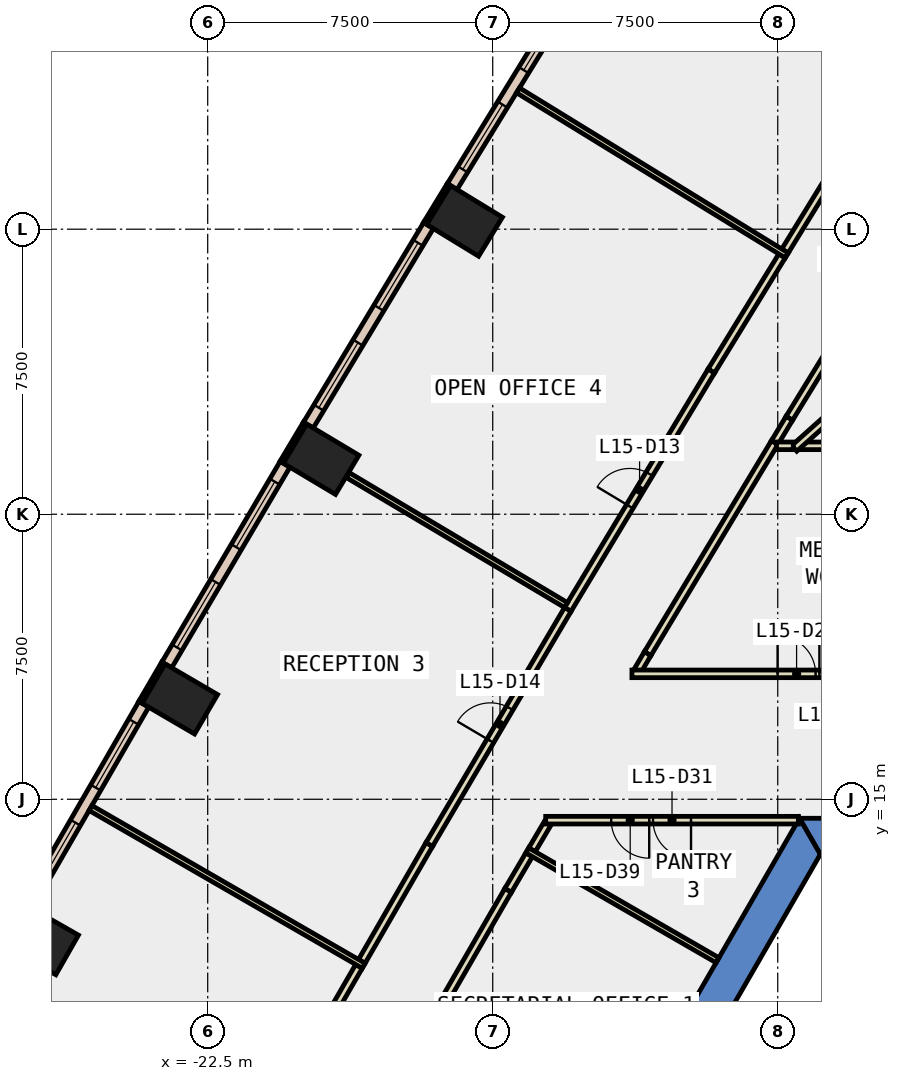
"""IFC4 building model, lengths in metres.
Left out: names, types, materials, properties, quantities, classifications, styles, units other than length and angle.
Written with IfcOpenShell. Run it as: python <this file> out.ifc"""

import sys

from ifc_helpers import new_model, si_unit, direction, frame, frame_2d, origin, origin_2d, place, context, subcontext, project, spatial, polyline, rectangle, outline, extrude, element, fill, save


model = new_model("IFC4")
c1 = context("Model", 3, precision=1e-05, world=origin(), true_north=direction((0.0, 1.0)))
c2 = subcontext(c1, "Body", "Model", "MODEL_VIEW")
j1 = project(units=[si_unit("LENGTHUNIT", "METRE"), si_unit("PLANEANGLEUNIT", "RADIAN")], contexts=[c1])
p1 = place(None, origin())
s1 = spatial("IfcSite", under=j1, at=p1, CompositionType="ELEMENT")
p2 = place(p1, origin())
s2 = spatial("IfcBuilding", under=s1, at=p2, CompositionType="ELEMENT")
p3 = place(p2, frame((0.0, 0.0, 72.8)))
s3 = spatial("IfcBuildingStorey", under=s2, at=p3, CompositionType="ELEMENT", Elevation=72.8)
for number, where, z_axis, x_axis in (
    (1, (-15.741, 30.219, -0.4), (0.0, 0.0, 1.0), (0.522, 0.853, 0.0)),
    (2, (-19.516, 23.947, -0.4), (0.0, 0.0, 1.0), (0.513, 0.858, 0.0)),
    (3, (-23.234, 17.64, -0.4), (0.0, 0.0, 1.0), (0.504, 0.864, 0.0)),
    (4, (-26.894, 11.301, -0.4), (0.0, 0.0, 1.0), (0.496, 0.869, 0.0)),
):
    element("IfcColumn", number, at=place(p3, frame(where, z_axis=z_axis, x_axis=x_axis)), inside=s3, PredefinedType="COLUMN", context=c2, shape_type="SweptSolid", body=[
        extrude(rectangle(XDim=1.2, YDim=1.6, at=origin_2d()), origin(), (0.0, 0.0, 1.0), 4.2),
    ])
p4 = place(p3, frame((0.0, 0.0, -0.4)))
e5 = element("IfcWall", 5, at=p4, inside=s3, PredefinedType="SHEAR", context=c2, shape_type="SweptSolid", body=[
    extrude(outline(polyline([(-4.55, 13.55), (-4.55, 14.5), (-6.928, 14.5), (-6.38, 13.55), (-4.55, 13.55)])), origin(), (0.0, 0.0, 1.0), 4.2),
])
p5 = place(p3, frame((0.0, 0.0, -0.4)))
e6 = element("IfcWall", 6, at=p5, inside=s3, PredefinedType="SHEAR", context=c2, shape_type="SweptSolid", body=[
    extrude(outline(polyline([(-12.267, 5.252), (-11.444, 4.777), (-6.38, 13.55), (-6.928, 14.5), (-12.267, 5.252)])), origin(), (0.0, 0.0, 1.0), 4.2),
])
p6 = place(p3, frame((-16.153, 31.174, 0.0), z_axis=(0.0, 0.0, 1.0), x_axis=(-0.521507599072, -0.853246637327, 0.0)))
e7 = element("IfcWall", 7, at=p6, inside=s3, PredefinedType="STANDARD", context=c2, shape_type="SweptSolid", body=[
    extrude(rectangle(XDim=1.2, YDim=0.1, at=frame_2d((0.6, 0.0))), origin(), (0.0, 0.0, 1.0), 3.8),
])
p7 = place(p3, frame((-19.938, 24.898, 0.0), z_axis=(0.0, 0.0, 1.0), x_axis=(-0.513238760752, -0.858245870635, 0.0)))
e8 = element("IfcWall", 8, at=p7, inside=s3, PredefinedType="STANDARD", context=c2, shape_type="SweptSolid", body=[
    extrude(rectangle(XDim=1.2, YDim=0.1, at=frame_2d((0.6, 0.0))), origin(), (0.0, 0.0, 1.0), 3.8),
])
p8 = place(p3, frame((-23.665, 18.587, 0.0), z_axis=(0.0, 0.0, 1.0), x_axis=(-0.504313844903, -0.863520437418, 0.0)))
e9 = element("IfcWall", 9, at=p8, inside=s3, PredefinedType="STANDARD", context=c2, shape_type="SweptSolid", body=[
    extrude(rectangle(XDim=1.2, YDim=0.1, at=frame_2d((0.6, 0.0))), origin(), (0.0, 0.0, 1.0), 3.8),
])
p9 = place(p3, frame((-12.858, 36.344, 0.0), z_axis=(0.0, 0.0, 1.0), x_axis=(-0.523421823151, -0.852073702827, 0.0)))
e10 = element("IfcWall", 10, at=p9, inside=s3, PredefinedType="STANDARD", context=c2, shape_type="SweptSolid", body=[
    extrude(rectangle(XDim=6.131, YDim=0.3, at=frame_2d((3.065, 0.0))), origin(), (0.0, 0.0, 1.0), 3.8),
])
p10 = place(p9, frame((0.533, 0.0, 0.9)))
e11 = element("IfcOpeningElement", 11, at=p10, cuts=e10, PredefinedType="OPENING", context=c2, shape_type="SweptSolid", body=[
    extrude(rectangle(XDim=2.0, YDim=2.6, at=frame_2d((1.0, 1.3))), frame((0.0, 0.16, 0.0), z_axis=(0.0, -1.0, 0.0), x_axis=(1.0, 0.0, 0.0)), (0.0, 0.0, 1.0), 0.32),
])
p11 = place(p9, frame((3.598, 0.0, 0.9)))
e12 = element("IfcOpeningElement", 12, at=p11, cuts=e10, PredefinedType="OPENING", context=c2, shape_type="SweptSolid", body=[
    extrude(rectangle(XDim=2.0, YDim=2.6, at=frame_2d((1.0, 1.3))), frame((0.0, 0.16, 0.0), z_axis=(0.0, -1.0, 0.0), x_axis=(1.0, 0.0, 0.0)), (0.0, 0.0, 1.0), 0.32),
])
p12 = place(p3, frame((-16.69, 30.097, 0.0), z_axis=(0.0, 0.0, 1.0), x_axis=(-0.515690089348, -0.856775193238, 0.0)))
e13 = element("IfcWall", 13, at=p12, inside=s3, PredefinedType="STANDARD", context=c2, shape_type="SweptSolid", body=[
    extrude(rectangle(XDim=6.13, YDim=0.3, at=frame_2d((3.065, 0.0))), origin(), (0.0, 0.0, 1.0), 3.8),
])
p13 = place(p12, frame((0.532, 0.0, 0.9)))
e14 = element("IfcOpeningElement", 14, at=p13, cuts=e13, PredefinedType="OPENING", context=c2, shape_type="SweptSolid", body=[
    extrude(rectangle(XDim=2.0, YDim=2.6, at=frame_2d((1.0, 1.3))), frame((0.0, 0.16, 0.0), z_axis=(0.0, -1.0, 0.0), x_axis=(1.0, 0.0, 0.0)), (0.0, 0.0, 1.0), 0.32),
])
p14 = place(p12, frame((3.597, 0.0, 0.9)))
e15 = element("IfcOpeningElement", 15, at=p14, cuts=e13, PredefinedType="OPENING", context=c2, shape_type="SweptSolid", body=[
    extrude(rectangle(XDim=2.0, YDim=2.6, at=frame_2d((1.0, 1.3))), frame((0.0, 0.16, 0.0), z_axis=(0.0, -1.0, 0.0), x_axis=(1.0, 0.0, 0.0)), (0.0, 0.0, 1.0), 0.32),
])
p15 = place(p3, frame((-20.464, 23.816, 0.0), z_axis=(0.0, 0.0, 1.0), x_axis=(-0.507716058644, -0.861524465001, 0.0)))
e16 = element("IfcWall", 16, at=p15, inside=s3, PredefinedType="STANDARD", context=c2, shape_type="SweptSolid", body=[
    extrude(rectangle(XDim=6.131, YDim=0.3, at=frame_2d((3.065, 0.0))), origin(), (0.0, 0.0, 1.0), 3.8),
])
p16 = place(p15, frame((0.533, 0.0, 0.9)))
e17 = element("IfcOpeningElement", 17, at=p16, cuts=e16, PredefinedType="OPENING", context=c2, shape_type="SweptSolid", body=[
    extrude(rectangle(XDim=2.0, YDim=2.6, at=frame_2d((1.0, 1.3))), frame((0.0, 0.16, 0.0), z_axis=(0.0, -1.0, 0.0), x_axis=(1.0, 0.0, 0.0)), (0.0, 0.0, 1.0), 0.32),
])
p17 = place(p15, frame((3.598, 0.0, 0.9)))
e18 = element("IfcOpeningElement", 18, at=p17, cuts=e16, PredefinedType="OPENING", context=c2, shape_type="SweptSolid", body=[
    extrude(rectangle(XDim=2.0, YDim=2.6, at=frame_2d((1.0, 1.3))), frame((0.0, 0.16, 0.0), z_axis=(0.0, -1.0, 0.0), x_axis=(1.0, 0.0, 0.0)), (0.0, 0.0, 1.0), 0.32),
])
p18 = place(p3, frame((-24.181, 17.5, 0.0), z_axis=(0.0, 0.0, 1.0), x_axis=(-0.499998239139, -0.866026420416, 0.0)))
e19 = element("IfcWall", 19, at=p18, inside=s3, PredefinedType="STANDARD", context=c2, shape_type="SweptSolid", body=[
    extrude(rectangle(XDim=6.13, YDim=0.3, at=frame_2d((3.065, 0.0))), origin(), (0.0, 0.0, 1.0), 3.8),
])
p19 = place(p18, frame((0.533, 0.0, 0.9)))
e20 = element("IfcOpeningElement", 20, at=p19, cuts=e19, PredefinedType="OPENING", context=c2, shape_type="SweptSolid", body=[
    extrude(rectangle(XDim=2.0, YDim=2.6, at=frame_2d((1.0, 1.3))), frame((0.0, 0.16, 0.0), z_axis=(0.0, -1.0, 0.0), x_axis=(1.0, 0.0, 0.0)), (0.0, 0.0, 1.0), 0.32),
])
p20 = place(p18, frame((3.598, 0.0, 0.9)))
e21 = element("IfcOpeningElement", 21, at=p20, cuts=e19, PredefinedType="OPENING", context=c2, shape_type="SweptSolid", body=[
    extrude(rectangle(XDim=2.0, YDim=2.6, at=frame_2d((1.0, 1.3))), frame((0.0, 0.16, 0.0), z_axis=(0.0, -1.0, 0.0), x_axis=(1.0, 0.0, 0.0)), (0.0, 0.0, 1.0), 0.32),
])
p21 = place(p3, frame((-14.042, 13.541, 0.0), z_axis=(0.0, 0.0, 1.0), x_axis=(-0.507733830316, -0.861513991501, 0.0)))
e22 = element("IfcWall", 22, at=p21, inside=s3, PredefinedType="PARTITIONING", context=c2, shape_type="SweptSolid", body=[
    extrude(rectangle(XDim=1.091, YDim=0.2, at=frame_2d((0.545, 0.0))), origin(), (0.0, 0.0, 1.0), 3.8),
])
p22 = place(p3, frame((-14.596, 12.601, 0.0), z_axis=(0.0, 0.0, 1.0), x_axis=(-0.500017431331, -0.866015339567, 0.0)))
e23 = element("IfcWall", 23, at=p22, inside=s3, PredefinedType="PARTITIONING", context=c2, shape_type="SweptSolid", body=[
    extrude(rectangle(XDim=4.8, YDim=0.2, at=frame_2d((2.4, 0.0))), origin(), (0.0, 0.0, 1.0), 3.8),
])
p23 = place(p3, frame((-13.557, 14.364, 0.0), z_axis=(0.0, 0.0, 1.0), x_axis=(-0.507840899418, -0.861450881292, 0.0)))
e24 = element("IfcWall", 24, at=p23, inside=s3, PredefinedType="PARTITIONING", context=c2, shape_type="SweptSolid", body=[
    extrude(rectangle(XDim=0.806, YDim=0.2, at=frame_2d((0.403, 0.0))), origin(), (0.0, 0.0, 1.0), 3.8),
])
p24 = place(p3, frame((-7.58, 24.386, 0.0), z_axis=(0.0, 0.0, 1.0), x_axis=(-0.51574664882, -0.85674114774, 0.0)))
e25 = element("IfcWall", 25, at=p24, inside=s3, PredefinedType="PARTITIONING", context=c2, shape_type="SweptSolid", body=[
    extrude(rectangle(XDim=6.484, YDim=0.2, at=frame_2d((3.242, 0.0))), origin(), (0.0, 0.0, 1.0), 3.8),
])
p25 = place(p3, frame((-10.924, 18.831, 0.0), z_axis=(0.0, 0.0, 1.0), x_axis=(-0.507247363226, -0.861800506208, 0.0)))
e26 = element("IfcWall", 26, at=p25, inside=s3, PredefinedType="PARTITIONING", context=c2, shape_type="SweptSolid", body=[
    extrude(rectangle(XDim=0.516, YDim=0.2, at=frame_2d((0.258, 0.0))), origin(), (0.0, 0.0, 1.0), 3.8),
])
p26 = place(p3, frame((-3.411, 31.185, 0.0), z_axis=(0.0, 0.0, 1.0), x_axis=(-0.523464329994, -0.852047589765, 0.0)))
e27 = element("IfcWall", 27, at=p26, inside=s3, PredefinedType="PARTITIONING", context=c2, shape_type="SweptSolid", body=[
    extrude(rectangle(XDim=7.231, YDim=0.2, at=frame_2d((3.615, 0.0))), origin(), (0.0, 0.0, 1.0), 3.8),
])
p27 = place(p26, frame((3.115, 0.0, 0.0)))
e28 = element("IfcOpeningElement", 28, at=p27, cuts=e27, PredefinedType="OPENING", context=c2, shape_type="SweptSolid", body=[
    extrude(rectangle(XDim=1.0, YDim=2.1, at=frame_2d((0.5, 1.05))), frame((0.0, 0.11, 0.0), z_axis=(0.0, -1.0, 0.0), x_axis=(1.0, 0.0, 0.0)), (0.0, 0.0, 1.0), 0.22),
])
p28 = place(p3, frame((-7.196, 25.024, 0.0), z_axis=(0.0, 0.0, 1.0), x_axis=(-0.515748848873, -0.856739823334, 0.0)))
e29 = element("IfcWall", 29, at=p28, inside=s3, PredefinedType="PARTITIONING", context=c2, shape_type="SweptSolid", body=[
    extrude(rectangle(XDim=0.745, YDim=0.2, at=frame_2d((0.372, 0.0))), origin(), (0.0, 0.0, 1.0), 3.8),
])
p29 = place(p3, frame((-7.309, 29.426, 0.0), z_axis=(0.0, 0.0, 1.0), x_axis=(0.523617783711, 0.851953294836, 0.0)))
e30 = element("IfcWall", 30, at=p29, inside=s3, PredefinedType="PARTITIONING", context=c2, shape_type="SweptSolid", body=[
    extrude(rectangle(XDim=3.551, YDim=0.2, at=frame_2d((1.775, 0.0))), origin(), (0.0, 0.0, 1.0), 3.8),
])
p30 = place(p3, frame((-13.025, 19.995, 0.0), z_axis=(0.0, 0.0, 1.0), x_axis=(0.515828195336, 0.856692052546, 0.0)))
e31 = element("IfcWall", 31, at=p30, inside=s3, PredefinedType="PARTITIONING", context=c2, shape_type="SweptSolid", body=[
    extrude(rectangle(XDim=7.326, YDim=0.2, at=frame_2d((3.663, 0.0))), origin(), (0.0, 0.0, 1.0), 3.8),
])
p31 = place(p30, frame((3.163, 0.0, 0.0)))
e32 = element("IfcOpeningElement", 32, at=p31, cuts=e31, PredefinedType="OPENING", context=c2, shape_type="SweptSolid", body=[
    extrude(rectangle(XDim=1.0, YDim=2.1, at=frame_2d((0.5, 1.05))), frame((0.0, 0.11, 0.0), z_axis=(0.0, -1.0, 0.0), x_axis=(1.0, 0.0, 0.0)), (0.0, 0.0, 1.0), 0.22),
])
p32 = place(p3, frame((-9.246, 26.271, 0.0), z_axis=(0.0, 0.0, 1.0), x_axis=(0.523341833043, 0.852122834917, 0.0)))
e33 = element("IfcWall", 33, at=p32, inside=s3, PredefinedType="PARTITIONING", context=c2, shape_type="SweptSolid", body=[
    extrude(rectangle(XDim=3.552, YDim=0.2, at=frame_2d((1.776, 0.0))), origin(), (0.0, 0.0, 1.0), 3.8),
])
p33 = place(p3, frame((-18.445, 10.734, 0.0), z_axis=(0.0, 0.0, 1.0), x_axis=(0.499900903336, 0.866082609711, 0.0)))
e34 = element("IfcWall", 34, at=p33, inside=s3, PredefinedType="PARTITIONING", context=c2, shape_type="SweptSolid", body=[
    extrude(rectangle(XDim=3.553, YDim=0.2, at=frame_2d((1.776, 0.0))), origin(), (0.0, 0.0, 1.0), 3.8),
])
p34 = place(p3, frame((-16.669, 13.811, 0.0), z_axis=(0.0, 0.0, 1.0), x_axis=(0.507777955495, 0.861487984776, 0.0)))
e35 = element("IfcWall", 35, at=p34, inside=s3, PredefinedType="PARTITIONING", context=c2, shape_type="SweptSolid", body=[
    extrude(rectangle(XDim=7.178, YDim=0.2, at=frame_2d((3.589, 0.0))), origin(), (0.0, 0.0, 1.0), 3.8),
])
p35 = place(p34, frame((3.164, 0.0, 0.0)))
e36 = element("IfcOpeningElement", 36, at=p35, cuts=e35, PredefinedType="OPENING", context=c2, shape_type="SweptSolid", body=[
    extrude(rectangle(XDim=1.0, YDim=2.1, at=frame_2d((0.5, 1.05))), frame((0.0, 0.11, 0.0), z_axis=(0.0, -1.0, 0.0), x_axis=(1.0, 0.0, 0.0)), (0.0, 0.0, 1.0), 0.22),
])
p36 = place(p3, frame((-20.296, 7.53, 0.0), z_axis=(0.0, 0.0, 1.0), x_axis=(0.500236350306, 0.865888903863, 0.0)))
e37 = element("IfcWall", 37, at=p36, inside=s3, PredefinedType="PARTITIONING", context=c2, shape_type="SweptSolid", body=[
    extrude(rectangle(XDim=3.55, YDim=0.2, at=frame_2d((1.775, 0.0))), origin(), (0.0, 0.0, 1.0), 3.8),
])
p37 = place(p3, frame((-14.091, 13.655, 0.0), z_axis=(0.0, 0.0, 1.0), x_axis=(0.866035778077, -0.499982030767, 0.0)))
e38 = element("IfcWall", 38, at=p37, inside=s3, PredefinedType="PARTITIONING", context=c2, shape_type="SweptSolid", body=[
    extrude(rectangle(XDim=5.781, YDim=0.15, at=frame_2d((2.89, 0.0))), origin(), (0.0, 0.0, 1.0), 3.8),
])
p38 = place(p3, frame((-6.957, 14.45, 0.0), z_axis=(0.0, 0.0, 1.0), x_axis=(-1.0, 0.0, 0.0)))
e39 = element("IfcWall", 39, at=p38, inside=s3, PredefinedType="PARTITIONING", context=c2, shape_type="SweptSolid", body=[
    extrude(rectangle(XDim=6.649, YDim=0.2, at=frame_2d((3.324, 0.0))), origin(), (0.0, 0.0, 1.0), 3.8),
])
p39 = place(p38, frame((2.825, 0.0, 0.0)))
e40 = element("IfcOpeningElement", 40, at=p39, cuts=e39, PredefinedType="OPENING", context=c2, shape_type="SweptSolid", body=[
    extrude(rectangle(XDim=1.0, YDim=2.1, at=frame_2d((0.5, 1.05))), frame((0.0, 0.11, 0.0), z_axis=(0.0, -1.0, 0.0), x_axis=(1.0, 0.0, 0.0)), (0.0, 0.0, 1.0), 0.22),
])
p40 = place(p38, frame((3.925, 0.0, 0.0)))
e41 = element("IfcOpeningElement", 41, at=p40, cuts=e39, PredefinedType="OPENING", context=c2, shape_type="SweptSolid", body=[
    extrude(rectangle(XDim=1.0, YDim=2.1, at=frame_2d((0.5, 1.05))), frame((0.0, 0.11, 0.0), z_axis=(0.0, -1.0, 0.0), x_axis=(1.0, 0.0, 0.0)), (0.0, 0.0, 1.0), 0.22),
])
p41 = place(p3, frame((-11.337, 18.3, 0.0), z_axis=(0.0, 0.0, 1.0), x_axis=(1.0, 0.0, 0.0)))
e42 = element("IfcWall", 42, at=p41, inside=s3, PredefinedType="PARTITIONING", context=c2, shape_type="SweptSolid", body=[
    extrude(rectangle(XDim=8.466, YDim=0.2, at=frame_2d((4.233, 0.0))), origin(), (0.0, 0.0, 1.0), 3.8),
])
p42 = place(p41, frame((3.833, 0.0, 0.0)))
e43 = element("IfcOpeningElement", 43, at=p42, cuts=e42, PredefinedType="OPENING", context=c2, shape_type="SweptSolid", body=[
    extrude(rectangle(XDim=1.0, YDim=2.1, at=frame_2d((0.5, 1.05))), frame((0.0, 0.11, 0.0), z_axis=(0.0, -1.0, 0.0), x_axis=(1.0, 0.0, 0.0)), (0.0, 0.0, 1.0), 0.22),
])
p43 = place(p41, frame((4.933, 0.0, 0.0)))
e44 = element("IfcOpeningElement", 44, at=p43, cuts=e42, PredefinedType="OPENING", context=c2, shape_type="SweptSolid", body=[
    extrude(rectangle(XDim=1.0, YDim=2.1, at=frame_2d((0.5, 1.05))), frame((0.0, 0.11, 0.0), z_axis=(0.0, -1.0, 0.0), x_axis=(1.0, 0.0, 0.0)), (0.0, 0.0, 1.0), 0.22),
])
p44 = place(p3, frame((-2.871, 24.3, 0.0), z_axis=(0.0, 0.0, 1.0), x_axis=(-1.0, 0.0, 0.0)))
e45 = element("IfcWall", 45, at=p44, inside=s3, PredefinedType="PARTITIONING", context=c2, shape_type="SweptSolid", body=[
    extrude(rectangle(XDim=4.02, YDim=0.2, at=frame_2d((2.01, 0.0))), origin(), (0.0, 0.0, 1.0), 3.8),
])
p45 = place(p3, frame((-7.065, 24.233, 0.0), z_axis=(0.0, 0.0, 1.0), x_axis=(0.745362618546, 0.666659258448, 0.0)))
e46 = element("IfcWall", 46, at=p45, inside=s3, PredefinedType="PARTITIONING", context=c2, shape_type="SweptSolid", body=[
    extrude(rectangle(XDim=9.579, YDim=0.2, at=frame_2d((4.79, 0.0))), origin(), (0.0, 0.0, 1.0), 3.8),
])
p46 = place(p3, frame((-7.532, 24.3, 0.0), z_axis=(0.0, 0.0, 1.0), x_axis=(1.0, 0.0, 0.0)))
e47 = element("IfcWall", 47, at=p46, inside=s3, PredefinedType="PARTITIONING", context=c2, shape_type="SweptSolid", body=[
    extrude(rectangle(XDim=0.441, YDim=0.2, at=frame_2d((0.22, 0.0))), origin(), (0.0, 0.0, 1.0), 3.8),
])
p47 = place(p3, frame((-7.263, 29.31, 0.0), z_axis=(0.0, 0.0, 1.0), x_axis=(-0.85208929269, 0.523396443706, 0.0)))
e48 = element("IfcWall", 48, at=p47, inside=s3, PredefinedType="PARTITIONING", context=c2, shape_type="SweptSolid", body=[
    extrude(rectangle(XDim=8.3, YDim=0.15, at=frame_2d((4.15, 0.0))), origin(), (0.0, 0.0, 1.0), 3.8),
])
p48 = place(p3, frame((-13.072, 20.11, 0.0), z_axis=(0.0, 0.0, 1.0), x_axis=(-0.859168554094, 0.511692676961, 0.0)))
e49 = element("IfcWall", 49, at=p48, inside=s3, PredefinedType="PARTITIONING", context=c2, shape_type="SweptSolid", body=[
    extrude(rectangle(XDim=6.68, YDim=0.15, at=frame_2d((3.34, 0.0))), origin(), (0.0, 0.0, 1.0), 3.8),
])
p49 = place(p3, frame((-18.396, 10.619, 0.0), z_axis=(0.0, 0.0, 1.0), x_axis=(-0.865966132161, 0.500102647413, 0.0)))
e50 = element("IfcWall", 50, at=p49, inside=s3, PredefinedType="PARTITIONING", context=c2, shape_type="SweptSolid", body=[
    extrude(rectangle(XDim=8.301, YDim=0.15, at=frame_2d((4.15, 0.0))), origin(), (0.0, 0.0, 1.0), 3.8),
])
p50 = place(p10, origin())
e51 = element("IfcWindow", 51, at=p50, inside=s3, PartitioningType="SINGLE_PANEL", PredefinedType="WINDOW", context=c2, shape_type="SweptSolid", body=[
    extrude(rectangle(XDim=2.0, YDim=2.6, at=frame_2d((1.0, 1.3))), frame((0.0, 0.03, 0.0), z_axis=(0.0, -1.0, 0.0), x_axis=(1.0, 0.0, 0.0)), (0.0, 0.0, 1.0), 0.06),
])
fill(e11, e51)
p51 = place(p11, origin())
e52 = element("IfcWindow", 52, at=p51, inside=s3, PartitioningType="SINGLE_PANEL", PredefinedType="WINDOW", context=c2, shape_type="SweptSolid", body=[
    extrude(rectangle(XDim=2.0, YDim=2.6, at=frame_2d((1.0, 1.3))), frame((0.0, 0.03, 0.0), z_axis=(0.0, -1.0, 0.0), x_axis=(1.0, 0.0, 0.0)), (0.0, 0.0, 1.0), 0.06),
])
fill(e12, e52)
p52 = place(p13, origin())
e53 = element("IfcWindow", 53, at=p52, inside=s3, PartitioningType="SINGLE_PANEL", PredefinedType="WINDOW", context=c2, shape_type="SweptSolid", body=[
    extrude(rectangle(XDim=2.0, YDim=2.6, at=frame_2d((1.0, 1.3))), frame((0.0, 0.03, 0.0), z_axis=(0.0, -1.0, 0.0), x_axis=(1.0, 0.0, 0.0)), (0.0, 0.0, 1.0), 0.06),
])
fill(e14, e53)
p53 = place(p14, origin())
e54 = element("IfcWindow", 54, at=p53, inside=s3, PartitioningType="SINGLE_PANEL", PredefinedType="WINDOW", context=c2, shape_type="SweptSolid", body=[
    extrude(rectangle(XDim=2.0, YDim=2.6, at=frame_2d((1.0, 1.3))), frame((0.0, 0.03, 0.0), z_axis=(0.0, -1.0, 0.0), x_axis=(1.0, 0.0, 0.0)), (0.0, 0.0, 1.0), 0.06),
])
fill(e15, e54)
p54 = place(p16, origin())
e55 = element("IfcWindow", 55, at=p54, inside=s3, PartitioningType="SINGLE_PANEL", PredefinedType="WINDOW", context=c2, shape_type="SweptSolid", body=[
    extrude(rectangle(XDim=2.0, YDim=2.6, at=frame_2d((1.0, 1.3))), frame((0.0, 0.03, 0.0), z_axis=(0.0, -1.0, 0.0), x_axis=(1.0, 0.0, 0.0)), (0.0, 0.0, 1.0), 0.06),
])
fill(e17, e55)
p55 = place(p17, origin())
e56 = element("IfcWindow", 56, at=p55, inside=s3, PartitioningType="SINGLE_PANEL", PredefinedType="WINDOW", context=c2, shape_type="SweptSolid", body=[
    extrude(rectangle(XDim=2.0, YDim=2.6, at=frame_2d((1.0, 1.3))), frame((0.0, 0.03, 0.0), z_axis=(0.0, -1.0, 0.0), x_axis=(1.0, 0.0, 0.0)), (0.0, 0.0, 1.0), 0.06),
])
fill(e18, e56)
p56 = place(p19, origin())
e57 = element("IfcWindow", 57, at=p56, inside=s3, PartitioningType="SINGLE_PANEL", PredefinedType="WINDOW", context=c2, shape_type="SweptSolid", body=[
    extrude(rectangle(XDim=2.0, YDim=2.6, at=frame_2d((1.0, 1.3))), frame((0.0, 0.03, 0.0), z_axis=(0.0, -1.0, 0.0), x_axis=(1.0, 0.0, 0.0)), (0.0, 0.0, 1.0), 0.06),
])
fill(e20, e57)
p57 = place(p20, origin())
e58 = element("IfcWindow", 58, at=p57, inside=s3, PartitioningType="SINGLE_PANEL", PredefinedType="WINDOW", context=c2, shape_type="SweptSolid", body=[
    extrude(rectangle(XDim=2.0, YDim=2.6, at=frame_2d((1.0, 1.3))), frame((0.0, 0.03, 0.0), z_axis=(0.0, -1.0, 0.0), x_axis=(1.0, 0.0, 0.0)), (0.0, 0.0, 1.0), 0.06),
])
fill(e21, e58)
p58 = place(p31, origin())
e59 = element("IfcDoor", 59, at=p58, inside=s3, OperationType="SINGLE_SWING_LEFT", PredefinedType="DOOR", context=c2, shape_type="SweptSolid", body=[
    extrude(rectangle(XDim=1.0, YDim=2.1, at=frame_2d((0.5, 1.05))), frame((0.0, 0.025, 0.0), z_axis=(0.0, -1.0, 0.0), x_axis=(1.0, 0.0, 0.0)), (0.0, 0.0, 1.0), 0.05),
])
fill(e32, e59)
p59 = place(p35, origin())
e60 = element("IfcDoor", 60, at=p59, inside=s3, OperationType="SINGLE_SWING_LEFT", PredefinedType="DOOR", context=c2, shape_type="SweptSolid", body=[
    extrude(rectangle(XDim=1.0, YDim=2.1, at=frame_2d((0.5, 1.05))), frame((0.0, 0.025, 0.0), z_axis=(0.0, -1.0, 0.0), x_axis=(1.0, 0.0, 0.0)), (0.0, 0.0, 1.0), 0.05),
])
fill(e36, e60)
p60 = place(p42, origin())
e61 = element("IfcDoor", 61, at=p60, inside=s3, OperationType="SINGLE_SWING_RIGHT", PredefinedType="DOOR", context=c2, shape_type="SweptSolid", body=[
    extrude(rectangle(XDim=1.0, YDim=2.1, at=frame_2d((0.5, 1.05))), frame((0.0, 0.025, 0.0), z_axis=(0.0, -1.0, 0.0), x_axis=(1.0, 0.0, 0.0)), (0.0, 0.0, 1.0), 0.05),
])
fill(e43, e61)
p61 = place(p39, origin())
e62 = element("IfcDoor", 62, at=p61, inside=s3, OperationType="SINGLE_SWING_LEFT", PredefinedType="DOOR", context=c2, shape_type="SweptSolid", body=[
    extrude(rectangle(XDim=1.0, YDim=2.1, at=frame_2d((0.5, 1.05))), frame((0.0, 0.025, 0.0), z_axis=(0.0, -1.0, 0.0), x_axis=(1.0, 0.0, 0.0)), (0.0, 0.0, 1.0), 0.05),
])
fill(e40, e62)
p62 = place(p43, origin())
e63 = element("IfcDoor", 63, at=p62, inside=s3, OperationType="SINGLE_SWING_RIGHT", PredefinedType="DOOR", context=c2, shape_type="SweptSolid", body=[
    extrude(rectangle(XDim=1.0, YDim=2.1, at=frame_2d((0.5, 1.05))), frame((0.0, 0.025, 0.0), z_axis=(0.0, -1.0, 0.0), x_axis=(1.0, 0.0, 0.0)), (0.0, 0.0, 1.0), 0.05),
])
fill(e44, e63)
p63 = place(p40, origin())
e64 = element("IfcDoor", 64, at=p63, inside=s3, OperationType="SINGLE_SWING_RIGHT", PredefinedType="DOOR", context=c2, shape_type="SweptSolid", body=[
    extrude(rectangle(XDim=1.0, YDim=2.1, at=frame_2d((0.5, 1.05))), frame((0.0, 0.025, 0.0), z_axis=(0.0, -1.0, 0.0), x_axis=(1.0, 0.0, 0.0)), (0.0, 0.0, 1.0), 0.05),
])
fill(e41, e64)
save(model, sys.argv[1])
